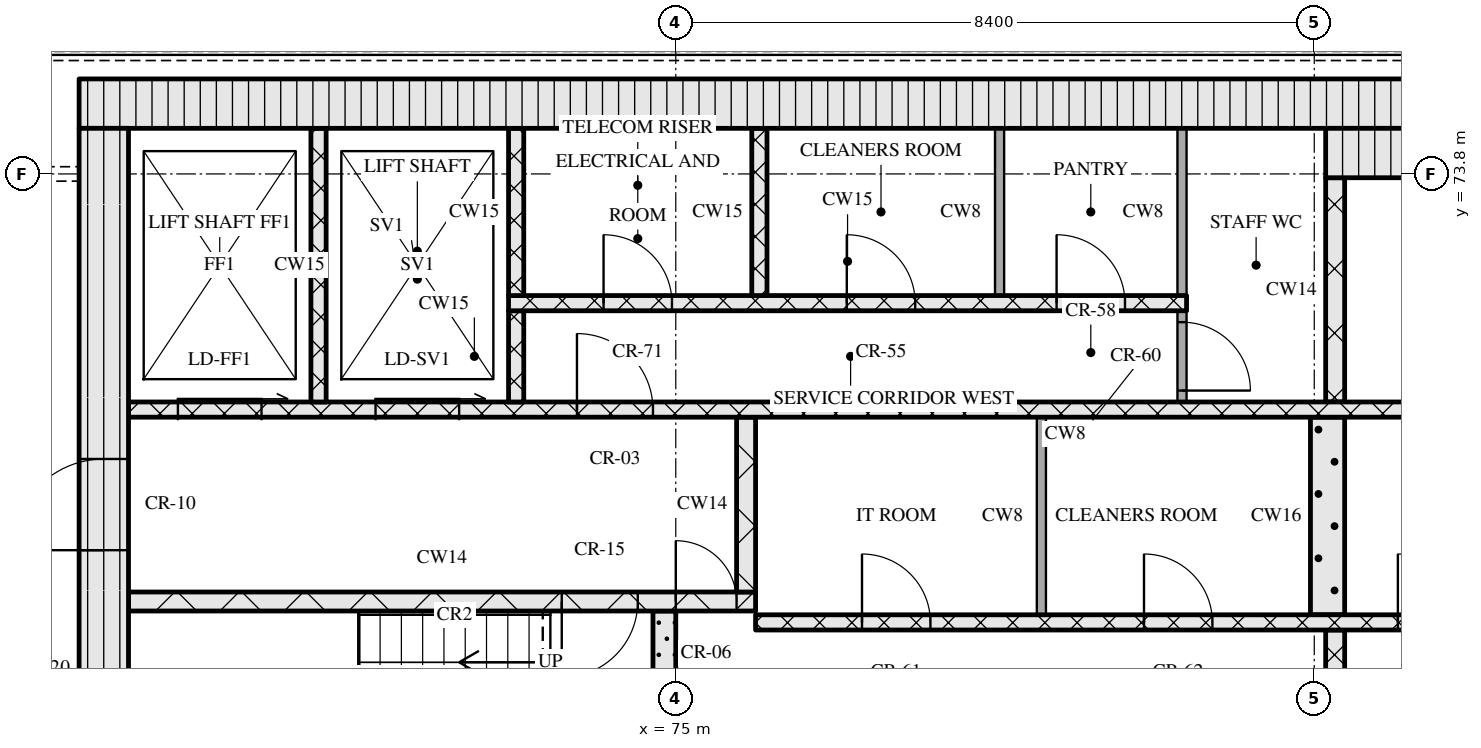
"""IFC4 building model, lengths in metres.
Left out: names, types, materials, properties, quantities, classifications, styles, units other than length and angle.
Written with IfcOpenShell. Run it as: python <this file> out.ifc"""

import sys

from ifc_helpers import new_model, si_unit, direction, frame, frame_2d, origin, place, context, subcontext, project, spatial, rectangle, extrude, element, fill, save


model = new_model("IFC4")
c1 = context("Model", 3, precision=1e-05, world=origin(), true_north=direction((0.0, 1.0)))
c2 = subcontext(c1, "Body", "Model", "MODEL_VIEW")
j1 = project(units=[si_unit("LENGTHUNIT", "METRE"), si_unit("PLANEANGLEUNIT", "RADIAN")], contexts=[c1])
p1 = place(None, origin())
s1 = spatial("IfcSite", under=j1, at=p1, CompositionType="ELEMENT")
p2 = place(p1, origin())
s2 = spatial("IfcBuilding", under=s1, at=p2, CompositionType="ELEMENT")
p3 = place(p2, frame((0.0, 0.0, 209.1)))
s3 = spatial("IfcBuildingStorey", under=s2, at=p3, CompositionType="ELEMENT", Elevation=209.1)
p4 = place(p3, frame((67.15, 74.725, 0.0), z_axis=(0.0, 0.0, 1.0), x_axis=(1.0, 0.0, 0.0)))
e1 = element("IfcWall", 1, at=p4, inside=s3, PredefinedType="SOLIDWALL", context=c2, shape_type="SweptSolid", body=[
    extrude(rectangle(XDim=40.9, YDim=0.65, at=frame_2d((20.45, 0.0))), origin(), (0.0, 0.0, 1.0), 3.32),
])
p5 = place(p3, frame((67.475, 62.4, 0.0), z_axis=(0.0, 0.0, 1.0), x_axis=(0.0, 1.0, 0.0)))
e2 = element("IfcWall", 2, at=p5, inside=s3, PredefinedType="SOLIDWALL", context=c2, shape_type="SweptSolid", body=[
    extrude(rectangle(XDim=12.0, YDim=0.65, at=frame_2d((6.0, 0.0))), origin(), (0.0, 0.0, 1.0), 3.32),
])
p6 = place(p5, frame((6.45, 0.0, 0.0)))
e3 = element("IfcOpeningElement", 3, at=p6, cuts=e2, PredefinedType="OPENING", context=c2, shape_type="SweptSolid", body=[
    extrude(rectangle(XDim=1.2, YDim=2.1, at=frame_2d((0.6, 1.05))), frame((0.0, 0.335, 0.0), z_axis=(0.0, -1.0, 0.0), x_axis=(1.0, 0.0, 0.0)), (0.0, 0.0, 1.0), 0.67),
])
p7 = place(p3, frame((74.85, 65.2, 0.0), z_axis=(0.0, 0.0, 1.0), x_axis=(0.0, 1.0, 0.0)))
e4 = element("IfcWall", 4, at=p7, inside=s3, PredefinedType="SOLIDWALL", context=c2, shape_type="SweptSolid", body=[
    extrude(rectangle(XDim=2.85, YDim=0.3, at=frame_2d((1.425, 0.0))), origin(), (0.0, 0.0, 1.0), 3.32),
])
p8 = place(p3, frame((83.675, 65.2, 0.0), z_axis=(0.0, 0.0, 1.0), x_axis=(0.0, 1.0, 0.0)))
e5 = element("IfcWall", 5, at=p8, inside=s3, PredefinedType="SOLIDWALL", context=c2, shape_type="SweptSolid", body=[
    extrude(rectangle(XDim=2.6, YDim=0.25, at=frame_2d((1.3, 0.0))), origin(), (0.0, 0.0, 1.0), 3.32),
])
p9 = place(p8, frame((0.7, 0.0, 0.0)))
e6 = element("IfcOpeningElement", 6, at=p9, cuts=e5, PredefinedType="OPENING", context=c2, shape_type="SweptSolid", body=[
    extrude(rectangle(XDim=1.2, YDim=2.1, at=frame_2d((0.6, 1.05))), frame((0.0, 0.135, 0.0), z_axis=(0.0, -1.0, 0.0), x_axis=(1.0, 0.0, 0.0)), (0.0, 0.0, 1.0), 0.27),
])
p10 = place(p3, frame((76.05, 67.9, 0.0), z_axis=(0.0, 0.0, 1.0), x_axis=(1.0, 0.0, 0.0)))
e7 = element("IfcWall", 7, at=p10, inside=s3, PredefinedType="SOLIDWALL", context=c2, shape_type="SweptSolid", body=[
    extrude(rectangle(XDim=23.1, YDim=0.2, at=frame_2d((11.55, 0.0))), origin(), (0.0, 0.0, 1.0), 3.32),
])
p11 = place(p10, frame((1.4, 0.0, 0.0)))
e8 = element("IfcOpeningElement", 8, at=p11, cuts=e7, PredefinedType="OPENING", context=c2, shape_type="SweptSolid", body=[
    extrude(rectangle(XDim=0.9, YDim=2.1, at=frame_2d((0.45, 1.05))), frame((0.0, 0.11, 0.0), z_axis=(0.0, -1.0, 0.0), x_axis=(1.0, 0.0, 0.0)), (0.0, 0.0, 1.0), 0.22),
])
p12 = place(p10, frame((5.11, 0.0, 0.0)))
e9 = element("IfcOpeningElement", 9, at=p12, cuts=e7, PredefinedType="OPENING", context=c2, shape_type="SweptSolid", body=[
    extrude(rectangle(XDim=0.9, YDim=2.1, at=frame_2d((0.45, 1.05))), frame((0.0, 0.11, 0.0), z_axis=(0.0, -1.0, 0.0), x_axis=(1.0, 0.0, 0.0)), (0.0, 0.0, 1.0), 0.22),
])
p13 = place(p10, frame((8.45, 0.0, 0.0)))
e10 = element("IfcOpeningElement", 10, at=p13, cuts=e7, PredefinedType="OPENING", context=c2, shape_type="SweptSolid", body=[
    extrude(rectangle(XDim=0.9, YDim=2.1, at=frame_2d((0.45, 1.05))), frame((0.0, 0.11, 0.0), z_axis=(0.0, -1.0, 0.0), x_axis=(1.0, 0.0, 0.0)), (0.0, 0.0, 1.0), 0.22),
])
p14 = place(p10, frame((10.91, 0.0, 0.0)))
e11 = element("IfcOpeningElement", 11, at=p14, cuts=e7, PredefinedType="OPENING", context=c2, shape_type="SweptSolid", body=[
    extrude(rectangle(XDim=0.9, YDim=2.1, at=frame_2d((0.45, 1.05))), frame((0.0, 0.11, 0.0), z_axis=(0.0, -1.0, 0.0), x_axis=(1.0, 0.0, 0.0)), (0.0, 0.0, 1.0), 0.22),
])
p15 = place(p10, frame((13.55, 0.0, 0.0)))
e12 = element("IfcOpeningElement", 12, at=p15, cuts=e7, PredefinedType="OPENING", context=c2, shape_type="SweptSolid", body=[
    extrude(rectangle(XDim=1.0, YDim=2.1, at=frame_2d((0.5, 1.05))), frame((0.0, 0.11, 0.0), z_axis=(0.0, -1.0, 0.0), x_axis=(1.0, 0.0, 0.0)), (0.0, 0.0, 1.0), 0.22),
])
p16 = place(p10, frame((16.2, 0.0, 0.0)))
e13 = element("IfcOpeningElement", 13, at=p16, cuts=e7, PredefinedType="OPENING", context=c2, shape_type="SweptSolid", body=[
    extrude(rectangle(XDim=1.1, YDim=2.1, at=frame_2d((0.55, 1.05))), frame((0.0, 0.11, 0.0), z_axis=(0.0, -1.0, 0.0), x_axis=(1.0, 0.0, 0.0)), (0.0, 0.0, 1.0), 0.22),
])
p17 = place(p10, frame((18.7, 0.0, 0.0)))
e14 = element("IfcOpeningElement", 14, at=p17, cuts=e7, PredefinedType="OPENING", context=c2, shape_type="SweptSolid", body=[
    extrude(rectangle(XDim=1.1, YDim=2.1, at=frame_2d((0.55, 1.05))), frame((0.0, 0.11, 0.0), z_axis=(0.0, -1.0, 0.0), x_axis=(1.0, 0.0, 0.0)), (0.0, 0.0, 1.0), 0.22),
])
p18 = place(p10, frame((21.2, 0.0, 0.0)))
e15 = element("IfcOpeningElement", 15, at=p18, cuts=e7, PredefinedType="OPENING", context=c2, shape_type="SweptSolid", body=[
    extrude(rectangle(XDim=1.1, YDim=2.1, at=frame_2d((0.55, 1.05))), frame((0.0, 0.11, 0.0), z_axis=(0.0, -1.0, 0.0), x_axis=(1.0, 0.0, 0.0)), (0.0, 0.0, 1.0), 0.22),
])
p19 = place(p3, frame((79.81, 68.0, 0.0), z_axis=(0.0, 0.0, 1.0), x_axis=(0.0, 1.0, 0.0)))
e16 = element("IfcWall", 16, at=p19, inside=s3, PredefinedType="PARTITIONING", context=c2, shape_type="SweptSolid", body=[
    extrude(rectangle(XDim=2.6, YDim=0.12, at=frame_2d((1.3, 0.0))), origin(), (0.0, 0.0, 1.0), 3.32),
])
p20 = place(p3, frame((83.575, 68.0, 0.0), z_axis=(0.0, 0.0, 1.0), x_axis=(0.0, 1.0, 0.0)))
e17 = element("IfcWall", 17, at=p20, inside=s3, PredefinedType="SOLIDWALL", context=c2, shape_type="SweptSolid", body=[
    extrude(rectangle(XDim=2.6, YDim=0.45, at=frame_2d((1.3, 0.0))), origin(), (0.0, 0.0, 1.0), 3.32),
])
p21 = place(p3, frame((67.8, 68.175, 0.0), z_axis=(0.0, 0.0, 1.0), x_axis=(1.0, 0.0, 0.0)))
e18 = element("IfcWall", 18, at=p21, inside=s3, PredefinedType="SOLIDWALL", context=c2, shape_type="SweptSolid", body=[
    extrude(rectangle(XDim=8.25, YDim=0.25, at=frame_2d((4.125, 0.0))), origin(), (0.0, 0.0, 1.0), 3.32),
])
p22 = place(p21, frame((5.7, 0.0, 0.0)))
e19 = element("IfcOpeningElement", 19, at=p22, cuts=e18, PredefinedType="OPENING", context=c2, shape_type="SweptSolid", body=[
    extrude(rectangle(XDim=1.0, YDim=2.1, at=frame_2d((0.5, 1.05))), frame((0.0, 0.135, 0.0), z_axis=(0.0, -1.0, 0.0), x_axis=(1.0, 0.0, 0.0)), (0.0, 0.0, 1.0), 0.27),
])
p23 = place(p21, frame((7.2, 0.0, 0.0)))
e20 = element("IfcOpeningElement", 20, at=p23, cuts=e18, PredefinedType="OPENING", context=c2, shape_type="SweptSolid", body=[
    extrude(rectangle(XDim=0.8, YDim=2.1, at=frame_2d((0.4, 1.05))), frame((0.0, 0.135, 0.0), z_axis=(0.0, -1.0, 0.0), x_axis=(1.0, 0.0, 0.0)), (0.0, 0.0, 1.0), 0.27),
])
p24 = place(p3, frame((75.925, 68.3, 0.0), z_axis=(0.0, 0.0, 1.0), x_axis=(0.0, 1.0, 0.0)))
e21 = element("IfcWall", 21, at=p24, inside=s3, PredefinedType="SOLIDWALL", context=c2, shape_type="SweptSolid", body=[
    extrude(rectangle(XDim=2.3, YDim=0.25, at=frame_2d((1.15, 0.0))), origin(), (0.0, 0.0, 1.0), 3.32),
])
p25 = place(p3, frame((67.8, 70.7, 0.0), z_axis=(0.0, 0.0, 1.0), x_axis=(1.0, 0.0, 0.0)))
e22 = element("IfcWall", 22, at=p25, inside=s3, PredefinedType="SOLIDWALL", context=c2, shape_type="SweptSolid", body=[
    extrude(rectangle(XDim=39.6, YDim=0.2, at=frame_2d((19.8, 0.0))), origin(), (0.0, 0.0, 1.0), 3.32),
])
p26 = place(p25, frame((0.65, 0.0, 0.0)))
e23 = element("IfcOpeningElement", 23, at=p26, cuts=e22, PredefinedType="OPENING", context=c2, shape_type="SweptSolid", body=[
    extrude(rectangle(XDim=1.1, YDim=2.1, at=frame_2d((0.55, 1.05))), frame((0.0, 0.11, 0.0), z_axis=(0.0, -1.0, 0.0), x_axis=(1.0, 0.0, 0.0)), (0.0, 0.0, 1.0), 0.22),
])
p27 = place(p25, frame((3.25, 0.0, 0.0)))
e24 = element("IfcOpeningElement", 24, at=p27, cuts=e22, PredefinedType="OPENING", context=c2, shape_type="SweptSolid", body=[
    extrude(rectangle(XDim=1.1, YDim=2.1, at=frame_2d((0.55, 1.05))), frame((0.0, 0.11, 0.0), z_axis=(0.0, -1.0, 0.0), x_axis=(1.0, 0.0, 0.0)), (0.0, 0.0, 1.0), 0.22),
])
p28 = place(p25, frame((5.9, 0.0, 0.0)))
e25 = element("IfcOpeningElement", 25, at=p28, cuts=e22, PredefinedType="OPENING", context=c2, shape_type="SweptSolid", body=[
    extrude(rectangle(XDim=1.0, YDim=2.1, at=frame_2d((0.5, 1.05))), frame((0.0, 0.11, 0.0), z_axis=(0.0, -1.0, 0.0), x_axis=(1.0, 0.0, 0.0)), (0.0, 0.0, 1.0), 0.22),
])
p29 = place(p25, frame((21.7, 0.0, 0.0)))
e26 = element("IfcOpeningElement", 26, at=p29, cuts=e22, PredefinedType="OPENING", context=c2, shape_type="SweptSolid", body=[
    extrude(rectangle(XDim=1.0, YDim=2.1, at=frame_2d((0.5, 1.05))), frame((0.0, 0.11, 0.0), z_axis=(0.0, -1.0, 0.0), x_axis=(1.0, 0.0, 0.0)), (0.0, 0.0, 1.0), 0.22),
])
p30 = place(p25, frame((32.7, 0.0, 0.0)))
e27 = element("IfcOpeningElement", 27, at=p30, cuts=e22, PredefinedType="OPENING", context=c2, shape_type="SweptSolid", body=[
    extrude(rectangle(XDim=1.0, YDim=2.1, at=frame_2d((0.5, 1.05))), frame((0.0, 0.11, 0.0), z_axis=(0.0, -1.0, 0.0), x_axis=(1.0, 0.0, 0.0)), (0.0, 0.0, 1.0), 0.22),
])
p31 = place(p25, frame((35.25, 0.0, 0.0)))
e28 = element("IfcOpeningElement", 28, at=p31, cuts=e22, PredefinedType="OPENING", context=c2, shape_type="SweptSolid", body=[
    extrude(rectangle(XDim=1.1, YDim=2.1, at=frame_2d((0.55, 1.05))), frame((0.0, 0.11, 0.0), z_axis=(0.0, -1.0, 0.0), x_axis=(1.0, 0.0, 0.0)), (0.0, 0.0, 1.0), 0.22),
])
p32 = place(p25, frame((37.85, 0.0, 0.0)))
e29 = element("IfcOpeningElement", 29, at=p32, cuts=e22, PredefinedType="OPENING", context=c2, shape_type="SweptSolid", body=[
    extrude(rectangle(XDim=1.1, YDim=2.1, at=frame_2d((0.55, 1.05))), frame((0.0, 0.11, 0.0), z_axis=(0.0, -1.0, 0.0), x_axis=(1.0, 0.0, 0.0)), (0.0, 0.0, 1.0), 0.22),
])
p33 = place(p3, frame((70.3, 70.8, 0.0), z_axis=(0.0, 0.0, 1.0), x_axis=(0.0, 1.0, 0.0)))
e30 = element("IfcWall", 30, at=p33, inside=s3, PredefinedType="SOLIDWALL", context=c2, shape_type="SweptSolid", body=[
    extrude(rectangle(XDim=3.6, YDim=0.2, at=frame_2d((1.8, 0.0))), origin(), (0.0, 0.0, 1.0), 3.32),
])
p34 = place(p3, frame((72.9, 70.8, 0.0), z_axis=(0.0, 0.0, 1.0), x_axis=(0.0, 1.0, 0.0)))
e31 = element("IfcWall", 31, at=p34, inside=s3, PredefinedType="SOLIDWALL", context=c2, shape_type="SweptSolid", body=[
    extrude(rectangle(XDim=1.2, YDim=0.2, at=frame_2d((0.6, 0.0))), origin(), (0.0, 0.0, 1.0), 3.32),
])
p35 = place(p3, frame((81.66, 70.8, 0.0), z_axis=(0.0, 0.0, 1.0), x_axis=(0.0, 1.0, 0.0)))
e32 = element("IfcWall", 32, at=p35, inside=s3, PredefinedType="PARTITIONING", context=c2, shape_type="SweptSolid", body=[
    extrude(rectangle(XDim=1.2, YDim=0.12, at=frame_2d((0.6, 0.0))), origin(), (0.0, 0.0, 1.0), 3.32),
])
p36 = place(p35, frame((0.15, 0.0, 0.0)))
e33 = element("IfcOpeningElement", 33, at=p36, cuts=e32, PredefinedType="OPENING", context=c2, shape_type="SweptSolid", body=[
    extrude(rectangle(XDim=0.9, YDim=2.1, at=frame_2d((0.45, 1.05))), frame((0.0, 0.07, 0.0), z_axis=(0.0, -1.0, 0.0), x_axis=(1.0, 0.0, 0.0)), (0.0, 0.0, 1.0), 0.14),
])
p37 = place(p3, frame((83.675, 70.8, 0.0), z_axis=(0.0, 0.0, 1.0), x_axis=(0.0, 1.0, 0.0)))
e34 = element("IfcWall", 34, at=p37, inside=s3, PredefinedType="SOLIDWALL", context=c2, shape_type="SweptSolid", body=[
    extrude(rectangle(XDim=2.95, YDim=0.25, at=frame_2d((1.475, 0.0))), origin(), (0.0, 0.0, 1.0), 3.32),
])
p38 = place(p3, frame((72.8, 72.1, 0.0), z_axis=(0.0, 0.0, 1.0), x_axis=(1.0, 0.0, 0.0)))
e35 = element("IfcWall", 35, at=p38, inside=s3, PredefinedType="SOLIDWALL", context=c2, shape_type="SweptSolid", body=[
    extrude(rectangle(XDim=8.92, YDim=0.2, at=frame_2d((4.46, 0.0))), origin(), (0.0, 0.0, 1.0), 3.32),
])
p39 = place(p38, frame((1.25, 0.0, 0.0)))
e36 = element("IfcOpeningElement", 36, at=p39, cuts=e35, PredefinedType="OPENING", context=c2, shape_type="SweptSolid", body=[
    extrude(rectangle(XDim=0.9, YDim=2.1, at=frame_2d((0.45, 1.05))), frame((0.0, 0.11, 0.0), z_axis=(0.0, -1.0, 0.0), x_axis=(1.0, 0.0, 0.0)), (0.0, 0.0, 1.0), 0.22),
])
p40 = place(p38, frame((4.45, 0.0, 0.0)))
e37 = element("IfcOpeningElement", 37, at=p40, cuts=e35, PredefinedType="OPENING", context=c2, shape_type="SweptSolid", body=[
    extrude(rectangle(XDim=0.9, YDim=2.1, at=frame_2d((0.45, 1.05))), frame((0.0, 0.11, 0.0), z_axis=(0.0, -1.0, 0.0), x_axis=(1.0, 0.0, 0.0)), (0.0, 0.0, 1.0), 0.22),
])
p41 = place(p38, frame((7.21, 0.0, 0.0)))
e38 = element("IfcOpeningElement", 38, at=p41, cuts=e35, PredefinedType="OPENING", context=c2, shape_type="SweptSolid", body=[
    extrude(rectangle(XDim=0.9, YDim=2.1, at=frame_2d((0.45, 1.05))), frame((0.0, 0.11, 0.0), z_axis=(0.0, -1.0, 0.0), x_axis=(1.0, 0.0, 0.0)), (0.0, 0.0, 1.0), 0.22),
])
for number, where, z_axis, x_axis in (
    (39, (72.9, 72.2, 0.0), (0.0, 0.0, 1.0), (0.0, 1.0, 0.0)),
    (40, (76.1, 72.2, 0.0), (0.0, 0.0, 1.0), (0.0, 1.0, 0.0)),
):
    element("IfcWall", number, at=place(p3, frame(where, z_axis=z_axis, x_axis=x_axis)), inside=s3, PredefinedType="SOLIDWALL", context=c2, shape_type="SweptSolid", body=[
        extrude(rectangle(XDim=2.2, YDim=0.2, at=frame_2d((1.1, 0.0))), origin(), (0.0, 0.0, 1.0), 3.32),
    ])
for number, where, z_axis, x_axis in (
    (41, (79.26, 72.2, 0.0), (0.0, 0.0, 1.0), (0.0, 1.0, 0.0)),
    (42, (81.66, 72.2, 0.0), (0.0, 0.0, 1.0), (0.0, 1.0, 0.0)),
):
    element("IfcWall", number, at=place(p3, frame(where, z_axis=z_axis, x_axis=x_axis)), inside=s3, PredefinedType="PARTITIONING", context=c2, shape_type="SweptSolid", body=[
        extrude(rectangle(XDim=2.2, YDim=0.12, at=frame_2d((1.1, 0.0))), origin(), (0.0, 0.0, 1.0), 3.32),
    ])
p42 = place(p3, frame((83.55, 74.075, 0.0), z_axis=(0.0, 0.0, 1.0), x_axis=(1.0, 0.0, 0.0)))
e43 = element("IfcWall", 43, at=p42, inside=s3, PredefinedType="SOLIDWALL", context=c2, shape_type="SweptSolid", body=[
    extrude(rectangle(XDim=8.1, YDim=0.65, at=frame_2d((4.05, 0.0))), origin(), (0.0, 0.0, 1.0), 3.32),
])
p43 = place(p11, origin())
e44 = element("IfcDoor", 44, at=p43, inside=s3, OperationType="SINGLE_SWING_LEFT", PredefinedType="DOOR", context=c2, shape_type="SweptSolid", body=[
    extrude(rectangle(XDim=0.9, YDim=2.1, at=frame_2d((0.45, 1.05))), frame((0.0, 0.025, 0.0), z_axis=(0.0, -1.0, 0.0), x_axis=(1.0, 0.0, 0.0)), (0.0, 0.0, 1.0), 0.05),
])
fill(e8, e44)
p44 = place(p12, origin())
e45 = element("IfcDoor", 45, at=p44, inside=s3, OperationType="SINGLE_SWING_LEFT", PredefinedType="DOOR", context=c2, shape_type="SweptSolid", body=[
    extrude(rectangle(XDim=0.9, YDim=2.1, at=frame_2d((0.45, 1.05))), frame((0.0, 0.025, 0.0), z_axis=(0.0, -1.0, 0.0), x_axis=(1.0, 0.0, 0.0)), (0.0, 0.0, 1.0), 0.05),
])
fill(e9, e45)
p45 = place(p13, origin())
e46 = element("IfcDoor", 46, at=p45, inside=s3, OperationType="SINGLE_SWING_LEFT", PredefinedType="DOOR", context=c2, shape_type="SweptSolid", body=[
    extrude(rectangle(XDim=0.9, YDim=2.1, at=frame_2d((0.45, 1.05))), frame((0.0, 0.025, 0.0), z_axis=(0.0, -1.0, 0.0), x_axis=(1.0, 0.0, 0.0)), (0.0, 0.0, 1.0), 0.05),
])
fill(e10, e46)
p46 = place(p22, origin())
e47 = element("IfcDoor", 47, at=p46, inside=s3, OperationType="SINGLE_SWING_RIGHT", PredefinedType="DOOR", context=c2, shape_type="SweptSolid", body=[
    extrude(rectangle(XDim=1.0, YDim=2.1, at=frame_2d((0.5, 1.05))), frame((0.0, 0.025, 0.0), z_axis=(0.0, -1.0, 0.0), x_axis=(1.0, 0.0, 0.0)), (0.0, 0.0, 1.0), 0.05),
])
fill(e19, e47)
p47 = place(p23, origin())
e48 = element("IfcDoor", 48, at=p47, inside=s3, OperationType="SINGLE_SWING_LEFT", PredefinedType="DOOR", context=c2, shape_type="SweptSolid", body=[
    extrude(rectangle(XDim=0.8, YDim=2.1, at=frame_2d((0.4, 1.05))), frame((0.0, 0.025, 0.0), z_axis=(0.0, -1.0, 0.0), x_axis=(1.0, 0.0, 0.0)), (0.0, 0.0, 1.0), 0.05),
])
fill(e20, e48)
p48 = place(p6, origin())
e49 = element("IfcDoor", 49, at=p48, inside=s3, OperationType="SINGLE_SWING_LEFT", PredefinedType="DOOR", context=c2, shape_type="SweptSolid", body=[
    extrude(rectangle(XDim=1.2, YDim=2.1, at=frame_2d((0.6, 1.05))), frame((0.0, 0.025, 0.0), z_axis=(0.0, -1.0, 0.0), x_axis=(1.0, 0.0, 0.0)), (0.0, 0.0, 1.0), 0.05),
])
fill(e3, e49)
p49 = place(p26, origin())
e50 = element("IfcDoor", 50, at=p49, inside=s3, OperationType="SLIDING_TO_RIGHT", PredefinedType="DOOR", context=c2, shape_type="SweptSolid", body=[
    extrude(rectangle(XDim=1.1, YDim=2.1, at=frame_2d((0.55, 1.05))), frame((0.0, 0.025, 0.0), z_axis=(0.0, -1.0, 0.0), x_axis=(1.0, 0.0, 0.0)), (0.0, 0.0, 1.0), 0.05),
])
fill(e23, e50)
p50 = place(p27, origin())
e51 = element("IfcDoor", 51, at=p50, inside=s3, OperationType="SLIDING_TO_RIGHT", PredefinedType="DOOR", context=c2, shape_type="SweptSolid", body=[
    extrude(rectangle(XDim=1.1, YDim=2.1, at=frame_2d((0.55, 1.05))), frame((0.0, 0.025, 0.0), z_axis=(0.0, -1.0, 0.0), x_axis=(1.0, 0.0, 0.0)), (0.0, 0.0, 1.0), 0.05),
])
fill(e24, e51)
p51 = place(p28, origin())
e52 = element("IfcDoor", 52, at=p51, inside=s3, OperationType="SINGLE_SWING_LEFT", PredefinedType="DOOR", context=c2, shape_type="SweptSolid", body=[
    extrude(rectangle(XDim=1.0, YDim=2.1, at=frame_2d((0.5, 1.05))), frame((0.0, 0.025, 0.0), z_axis=(0.0, -1.0, 0.0), x_axis=(1.0, 0.0, 0.0)), (0.0, 0.0, 1.0), 0.05),
])
fill(e25, e52)
p52 = place(p36, origin())
e53 = element("IfcDoor", 53, at=p52, inside=s3, OperationType="SINGLE_SWING_RIGHT", PredefinedType="DOOR", context=c2, shape_type="SweptSolid", body=[
    extrude(rectangle(XDim=0.9, YDim=2.1, at=frame_2d((0.45, 1.05))), frame((0.0, 0.025, 0.0), z_axis=(0.0, -1.0, 0.0), x_axis=(1.0, 0.0, 0.0)), (0.0, 0.0, 1.0), 0.05),
])
fill(e33, e53)
p53 = place(p39, origin())
e54 = element("IfcDoor", 54, at=p53, inside=s3, OperationType="SINGLE_SWING_LEFT", PredefinedType="DOOR", context=c2, shape_type="SweptSolid", body=[
    extrude(rectangle(XDim=0.9, YDim=2.1, at=frame_2d((0.45, 1.05))), frame((0.0, 0.025, 0.0), z_axis=(0.0, -1.0, 0.0), x_axis=(1.0, 0.0, 0.0)), (0.0, 0.0, 1.0), 0.05),
])
fill(e36, e54)
p54 = place(p40, origin())
e55 = element("IfcDoor", 55, at=p54, inside=s3, OperationType="SINGLE_SWING_LEFT", PredefinedType="DOOR", context=c2, shape_type="SweptSolid", body=[
    extrude(rectangle(XDim=0.9, YDim=2.1, at=frame_2d((0.45, 1.05))), frame((0.0, 0.025, 0.0), z_axis=(0.0, -1.0, 0.0), x_axis=(1.0, 0.0, 0.0)), (0.0, 0.0, 1.0), 0.05),
])
fill(e37, e55)
p55 = place(p41, origin())
e56 = element("IfcDoor", 56, at=p55, inside=s3, OperationType="SINGLE_SWING_LEFT", PredefinedType="DOOR", context=c2, shape_type="SweptSolid", body=[
    extrude(rectangle(XDim=0.9, YDim=2.1, at=frame_2d((0.45, 1.05))), frame((0.0, 0.025, 0.0), z_axis=(0.0, -1.0, 0.0), x_axis=(1.0, 0.0, 0.0)), (0.0, 0.0, 1.0), 0.05),
])
fill(e38, e56)
save(model, sys.argv[1])
